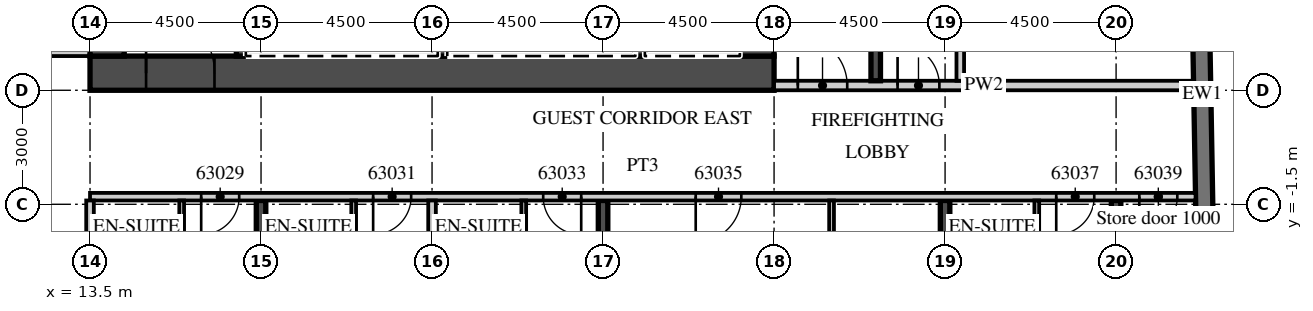
"""IFC4 building model, lengths in metres.
Left out: names, types, materials, properties, quantities, classifications, styles, units other than length and angle.
Written with IfcOpenShell. Run it as: python <this file> out.ifc"""

import sys

from ifc_helpers import new_model, si_unit, direction, frame, frame_2d, origin, place, context, subcontext, project, spatial, rectangle, extrude, element, fill, save


model = new_model("IFC4")
c1 = context("Model", 3, precision=1e-05, world=origin(), true_north=direction((0.0, 1.0)))
c2 = subcontext(c1, "Body", "Model", "MODEL_VIEW")
j1 = project(units=[si_unit("LENGTHUNIT", "METRE"), si_unit("PLANEANGLEUNIT", "RADIAN")], contexts=[c1])
p1 = place(None, origin())
s1 = spatial("IfcSite", under=j1, at=p1, CompositionType="ELEMENT")
p2 = place(p1, origin())
s2 = spatial("IfcBuilding", under=s1, at=p2, CompositionType="ELEMENT")
p3 = place(p2, frame((0.0, 0.0, 254.0)))
s3 = spatial("IfcBuildingStorey", under=s2, at=p3, CompositionType="ELEMENT", Elevation=254.0)
p4 = place(p3, frame((18.0, -19.079, 0.0), z_axis=(0.0, 0.0, 1.0), x_axis=(0.0, 1.0, 0.0)))
e1 = element("IfcWall", 1, at=p4, inside=s3, PredefinedType="SHEAR", context=c2, shape_type="SweptSolid", body=[
    extrude(rectangle(XDim=17.679, YDim=0.25, at=frame_2d((8.84, 0.0))), origin(), (0.0, 0.0, 1.0), 3.0),
])
p5 = place(p3, frame((27.0, -18.922, 0.0), z_axis=(0.0, 0.0, 1.0), x_axis=(0.0, 1.0, 0.0)))
e2 = element("IfcWall", 2, at=p5, inside=s3, PredefinedType="SHEAR", context=c2, shape_type="SweptSolid", body=[
    extrude(rectangle(XDim=17.522, YDim=0.25, at=frame_2d((8.761, 0.0))), origin(), (0.0, 0.0, 1.0), 3.0),
])
p6 = place(p3, frame((36.0, -18.765, 0.0), z_axis=(0.0, 0.0, 1.0), x_axis=(0.0, 1.0, 0.0)))
e3 = element("IfcWall", 3, at=p6, inside=s3, PredefinedType="SHEAR", context=c2, shape_type="SweptSolid", body=[
    extrude(rectangle(XDim=17.365, YDim=0.25, at=frame_2d((8.683, 0.0))), origin(), (0.0, 0.0, 1.0), 3.0),
])
p7 = place(p3, frame((40.5, -18.325, 0.0), z_axis=(0.0, 0.0, 1.0), x_axis=(0.0, 1.0, 0.0)))
e4 = element("IfcWall", 4, at=p7, inside=s3, PredefinedType="SHEAR", context=c2, shape_type="SweptSolid", body=[
    extrude(rectangle(XDim=16.925, YDim=0.25, at=frame_2d((8.463, 0.0))), origin(), (0.0, 0.0, 1.0), 3.0),
])
p8 = place(p3, frame((43.057, -15.103, 0.0), z_axis=(0.0, 0.0, 1.0), x_axis=(-0.017452408953, 0.999847695112, 0.0)))
e5 = element("IfcWall", 5, at=p8, inside=s3, PredefinedType="SOLIDWALL", context=c2, shape_type="SweptSolid", body=[
    extrude(rectangle(XDim=33.0, YDim=0.45, at=frame_2d((16.5, 0.0))), origin(), (0.0, 0.0, 1.0), 3.0),
])
p9 = place(p3, frame((-13.5, 2.5, 0.0), z_axis=(0.0, 0.0, 1.0), x_axis=(1.0, 0.0, 0.0)))
e6 = element("IfcWall", 6, at=p9, inside=s3, PredefinedType="PARTITIONING", context=c2, shape_type="SweptSolid", body=[
    extrude(rectangle(XDim=27.0, YDim=0.2, at=frame_2d((13.5, 0.0))), origin(), (0.0, 0.0, 1.0), 3.0),
])
p10 = place(p9, frame((0.575, 0.0, 0.0)))
e7 = element("IfcOpeningElement", 7, at=p10, cuts=e6, PredefinedType="OPENING", context=c2, shape_type="SweptSolid", body=[
    extrude(rectangle(XDim=1.0, YDim=2.1, at=frame_2d((0.5, 1.05))), frame((0.0, 0.11, 0.0), z_axis=(0.0, -1.0, 0.0), x_axis=(1.0, 0.0, 0.0)), (0.0, 0.0, 1.0), 0.22),
])
p11 = place(p9, frame((7.45, 0.0, 0.0)))
e8 = element("IfcOpeningElement", 8, at=p11, cuts=e6, PredefinedType="OPENING", context=c2, shape_type="SweptSolid", body=[
    extrude(rectangle(XDim=1.0, YDim=2.1, at=frame_2d((0.5, 1.05))), frame((0.0, 0.11, 0.0), z_axis=(0.0, -1.0, 0.0), x_axis=(1.0, 0.0, 0.0)), (0.0, 0.0, 1.0), 0.22),
])
p12 = place(p9, frame((11.925, 0.0, 0.0)))
e9 = element("IfcOpeningElement", 9, at=p12, cuts=e6, PredefinedType="OPENING", context=c2, shape_type="SweptSolid", body=[
    extrude(rectangle(XDim=1.0, YDim=2.1, at=frame_2d((0.5, 1.05))), frame((0.0, 0.11, 0.0), z_axis=(0.0, -1.0, 0.0), x_axis=(1.0, 0.0, 0.0)), (0.0, 0.0, 1.0), 0.22),
])
p13 = place(p9, frame((18.862, 0.0, 0.0)))
e10 = element("IfcOpeningElement", 10, at=p13, cuts=e6, PredefinedType="OPENING", context=c2, shape_type="SweptSolid", body=[
    extrude(rectangle(XDim=1.2, YDim=2.1, at=frame_2d((0.6, 1.05))), frame((0.0, 0.11, 0.0), z_axis=(0.0, -1.0, 0.0), x_axis=(1.0, 0.0, 0.0)), (0.0, 0.0, 1.0), 0.22),
])
p14 = place(p9, frame((23.075, 0.0, 0.0)))
e11 = element("IfcOpeningElement", 11, at=p14, cuts=e6, PredefinedType="OPENING", context=c2, shape_type="SweptSolid", body=[
    extrude(rectangle(XDim=1.0, YDim=2.1, at=frame_2d((0.5, 1.05))), frame((0.0, 0.11, 0.0), z_axis=(0.0, -1.0, 0.0), x_axis=(1.0, 0.0, 0.0)), (0.0, 0.0, 1.0), 0.22),
])
p15 = place(p3, frame((13.5, -1.3, 0.0), z_axis=(0.0, 0.0, 1.0), x_axis=(1.0, 0.0, 0.0)))
e12 = element("IfcWall", 12, at=p15, inside=s3, PredefinedType="PARTITIONING", context=c2, shape_type="SweptSolid", body=[
    extrude(rectangle(XDim=29.091, YDim=0.2, at=frame_2d((14.545, 0.0))), origin(), (0.0, 0.0, 1.0), 3.0),
])
p16 = place(p15, frame((2.925, 0.0, 0.0)))
e13 = element("IfcOpeningElement", 13, at=p16, cuts=e12, PredefinedType="OPENING", context=c2, shape_type="SweptSolid", body=[
    extrude(rectangle(XDim=1.0, YDim=2.1, at=frame_2d((0.5, 1.05))), frame((0.0, 0.11, 0.0), z_axis=(0.0, -1.0, 0.0), x_axis=(1.0, 0.0, 0.0)), (0.0, 0.0, 1.0), 0.22),
])
p17 = place(p15, frame((7.45, 0.0, 0.0)))
e14 = element("IfcOpeningElement", 14, at=p17, cuts=e12, PredefinedType="OPENING", context=c2, shape_type="SweptSolid", body=[
    extrude(rectangle(XDim=1.0, YDim=2.1, at=frame_2d((0.5, 1.05))), frame((0.0, 0.11, 0.0), z_axis=(0.0, -1.0, 0.0), x_axis=(1.0, 0.0, 0.0)), (0.0, 0.0, 1.0), 0.22),
])
p18 = place(p15, frame((11.925, 0.0, 0.0)))
e15 = element("IfcOpeningElement", 15, at=p18, cuts=e12, PredefinedType="OPENING", context=c2, shape_type="SweptSolid", body=[
    extrude(rectangle(XDim=1.0, YDim=2.1, at=frame_2d((0.5, 1.05))), frame((0.0, 0.11, 0.0), z_axis=(0.0, -1.0, 0.0), x_axis=(1.0, 0.0, 0.0)), (0.0, 0.0, 1.0), 0.22),
])
p19 = place(p15, frame((15.938, 0.0, 0.0)))
e16 = element("IfcOpeningElement", 16, at=p19, cuts=e12, PredefinedType="OPENING", context=c2, shape_type="SweptSolid", body=[
    extrude(rectangle(XDim=1.2, YDim=2.1, at=frame_2d((0.6, 1.05))), frame((0.0, 0.11, 0.0), z_axis=(0.0, -1.0, 0.0), x_axis=(1.0, 0.0, 0.0)), (0.0, 0.0, 1.0), 0.22),
])
p20 = place(p15, frame((25.425, 0.0, 0.0)))
e17 = element("IfcOpeningElement", 17, at=p20, cuts=e12, PredefinedType="OPENING", context=c2, shape_type="SweptSolid", body=[
    extrude(rectangle(XDim=1.0, YDim=2.1, at=frame_2d((0.5, 1.05))), frame((0.0, 0.11, 0.0), z_axis=(0.0, -1.0, 0.0), x_axis=(1.0, 0.0, 0.0)), (0.0, 0.0, 1.0), 0.22),
])
p21 = place(p15, frame((27.611, 0.0, 0.0)))
e18 = element("IfcOpeningElement", 18, at=p21, cuts=e12, PredefinedType="OPENING", context=c2, shape_type="SweptSolid", body=[
    extrude(rectangle(XDim=1.0, YDim=2.4, at=frame_2d((0.5, 1.2))), frame((0.0, 0.11, 0.0), z_axis=(0.0, -1.0, 0.0), x_axis=(1.0, 0.0, 0.0)), (0.0, 0.0, 1.0), 0.22),
])
p22 = place(p3, frame((13.5, -19.17, 0.0), z_axis=(0.0, 0.0, 1.0), x_axis=(0.0, 1.0, 0.0)))
e19 = element("IfcWall", 19, at=p22, inside=s3, PredefinedType="PARTITIONING", context=c2, shape_type="SweptSolid", body=[
    extrude(rectangle(XDim=17.77, YDim=0.2, at=frame_2d((8.885, 0.0))), origin(), (0.0, 0.0, 1.0), 3.0),
])
p23 = place(p3, frame((15.912, -6.125, 0.0), z_axis=(0.0, 0.0, 1.0), x_axis=(0.0, 1.0, 0.0)))
e20 = element("IfcWall", 20, at=p23, inside=s3, PredefinedType="PARTITIONING", context=c2, shape_type="SweptSolid", body=[
    extrude(rectangle(XDim=4.725, YDim=0.125, at=frame_2d((2.363, 0.0))), origin(), (0.0, 0.0, 1.0), 3.0),
])
p24 = place(p23, frame((1.375, 0.0, 0.0)))
e21 = element("IfcOpeningElement", 21, at=p24, cuts=e20, PredefinedType="OPENING", context=c2, shape_type="SweptSolid", body=[
    extrude(rectangle(XDim=0.9, YDim=2.1, at=frame_2d((0.45, 1.05))), frame((0.0, 0.073, 0.0), z_axis=(0.0, -1.0, 0.0), x_axis=(1.0, 0.0, 0.0)), (0.0, 0.0, 1.0), 0.145),
])
p25 = place(p3, frame((22.5, -19.013, 0.0), z_axis=(0.0, 0.0, 1.0), x_axis=(0.0, 1.0, 0.0)))
e22 = element("IfcWall", 22, at=p25, inside=s3, PredefinedType="PARTITIONING", context=c2, shape_type="SweptSolid", body=[
    extrude(rectangle(XDim=17.613, YDim=0.2, at=frame_2d((8.807, 0.0))), origin(), (0.0, 0.0, 1.0), 3.0),
])
p26 = place(p3, frame((20.438, -6.125, 0.0), z_axis=(0.0, 0.0, 1.0), x_axis=(0.0, 1.0, 0.0)))
e23 = element("IfcWall", 23, at=p26, inside=s3, PredefinedType="PARTITIONING", context=c2, shape_type="SweptSolid", body=[
    extrude(rectangle(XDim=4.725, YDim=0.125, at=frame_2d((2.363, 0.0))), origin(), (0.0, 0.0, 1.0), 3.0),
])
p27 = place(p26, frame((1.375, 0.0, 0.0)))
e24 = element("IfcOpeningElement", 24, at=p27, cuts=e23, PredefinedType="OPENING", context=c2, shape_type="SweptSolid", body=[
    extrude(rectangle(XDim=0.9, YDim=2.1, at=frame_2d((0.45, 1.05))), frame((0.0, 0.073, 0.0), z_axis=(0.0, -1.0, 0.0), x_axis=(1.0, 0.0, 0.0)), (0.0, 0.0, 1.0), 0.145),
])
p28 = place(p3, frame((24.913, -6.125, 0.0), z_axis=(0.0, 0.0, 1.0), x_axis=(0.0, 1.0, 0.0)))
e25 = element("IfcWall", 25, at=p28, inside=s3, PredefinedType="PARTITIONING", context=c2, shape_type="SweptSolid", body=[
    extrude(rectangle(XDim=4.725, YDim=0.125, at=frame_2d((2.363, 0.0))), origin(), (0.0, 0.0, 1.0), 3.0),
])
p29 = place(p28, frame((1.375, 0.0, 0.0)))
e26 = element("IfcOpeningElement", 26, at=p29, cuts=e25, PredefinedType="OPENING", context=c2, shape_type="SweptSolid", body=[
    extrude(rectangle(XDim=0.9, YDim=2.1, at=frame_2d((0.45, 1.05))), frame((0.0, 0.073, 0.0), z_axis=(0.0, -1.0, 0.0), x_axis=(1.0, 0.0, 0.0)), (0.0, 0.0, 1.0), 0.145),
])
p30 = place(p3, frame((33.013, -6.125, 0.0), z_axis=(0.0, 0.0, 1.0), x_axis=(0.0, 1.0, 0.0)))
e27 = element("IfcWall", 27, at=p30, inside=s3, PredefinedType="PARTITIONING", context=c2, shape_type="SweptSolid", body=[
    extrude(rectangle(XDim=4.725, YDim=0.125, at=frame_2d((2.363, 0.0))), origin(), (0.0, 0.0, 1.0), 3.0),
])
p31 = place(p30, frame((1.375, 0.0, 0.0)))
e28 = element("IfcOpeningElement", 28, at=p31, cuts=e27, PredefinedType="OPENING", context=c2, shape_type="SweptSolid", body=[
    extrude(rectangle(XDim=0.9, YDim=2.1, at=frame_2d((0.45, 1.05))), frame((0.0, 0.073, 0.0), z_axis=(0.0, -1.0, 0.0), x_axis=(1.0, 0.0, 0.0)), (0.0, 0.0, 1.0), 0.145),
])
p32 = place(p3, frame((38.413, -6.125, 0.0), z_axis=(0.0, 0.0, 1.0), x_axis=(0.0, 1.0, 0.0)))
e29 = element("IfcWall", 29, at=p32, inside=s3, PredefinedType="PARTITIONING", context=c2, shape_type="SweptSolid", body=[
    extrude(rectangle(XDim=4.725, YDim=0.125, at=frame_2d((2.363, 0.0))), origin(), (0.0, 0.0, 1.0), 3.0),
])
p33 = place(p32, frame((1.375, 0.0, 0.0)))
e30 = element("IfcOpeningElement", 30, at=p33, cuts=e29, PredefinedType="OPENING", context=c2, shape_type="SweptSolid", body=[
    extrude(rectangle(XDim=0.9, YDim=2.1, at=frame_2d((0.45, 1.05))), frame((0.0, 0.073, 0.0), z_axis=(0.0, -1.0, 0.0), x_axis=(1.0, 0.0, 0.0)), (0.0, 0.0, 1.0), 0.145),
])
p34 = place(p3, frame((13.5, 1.95, 0.0), z_axis=(0.0, 0.0, 1.0), x_axis=(1.0, 0.0, 0.0)))
e31 = element("IfcWall", 31, at=p34, inside=s3, PredefinedType="SHEAR", context=c2, shape_type="SweptSolid", body=[
    extrude(rectangle(XDim=18.0, YDim=0.9, at=frame_2d((9.0, 0.0))), origin(), (0.0, 0.0, 1.0), 3.0),
])
p35 = place(p34, frame((1.475, 0.0, 0.0)))
e32 = element("IfcOpeningElement", 32, at=p35, cuts=e31, PredefinedType="OPENING", context=c2, shape_type="SweptSolid", body=[
    extrude(rectangle(XDim=1.8, YDim=2.1, at=frame_2d((0.9, 1.05))), frame((0.0, 0.46, 0.0), z_axis=(0.0, -1.0, 0.0), x_axis=(1.0, 0.0, 0.0)), (0.0, 0.0, 1.0), 0.92),
])
p36 = place(p3, frame((31.05, 2.4, 0.0), z_axis=(0.0, 0.0, 1.0), x_axis=(0.0, 1.0, 0.0)))
e33 = element("IfcWall", 33, at=p36, inside=s3, PredefinedType="SHEAR", context=c2, shape_type="SweptSolid", body=[
    extrude(rectangle(XDim=12.8, YDim=0.9, at=frame_2d((6.4, 0.0))), origin(), (0.0, 0.0, 1.0), 3.0),
])
p37 = place(p36, frame((0.2, 0.0, 0.0)))
e34 = element("IfcOpeningElement", 34, at=p37, cuts=e33, PredefinedType="OPENING", context=c2, shape_type="SweptSolid", body=[
    extrude(rectangle(XDim=1.1, YDim=2.1, at=frame_2d((0.55, 1.05))), frame((0.0, 0.46, 0.0), z_axis=(0.0, -1.0, 0.0), x_axis=(1.0, 0.0, 0.0)), (0.0, 0.0, 1.0), 0.92),
])
p38 = place(p3, frame((13.95, 2.4, 0.0), z_axis=(0.0, 0.0, 1.0), x_axis=(0.0, 1.0, 0.0)))
e35 = element("IfcWall", 35, at=p38, inside=s3, PredefinedType="SHEAR", context=c2, shape_type="SweptSolid", body=[
    extrude(rectangle(XDim=12.2, YDim=0.9, at=frame_2d((6.1, 0.0))), origin(), (0.0, 0.0, 1.0), 3.0),
])
p39 = place(p3, frame((17.475, 2.4, 0.0), z_axis=(0.0, 0.0, 1.0), x_axis=(0.0, 1.0, 0.0)))
e36 = element("IfcWall", 36, at=p39, inside=s3, PredefinedType="SHEAR", context=c2, shape_type="SweptSolid", body=[
    extrude(rectangle(XDim=3.15, YDim=0.25, at=frame_2d((1.575, 0.0))), origin(), (0.0, 0.0, 1.0), 3.0),
])
for number, where, z_axis, x_axis in (
    (37, (27.975, 2.4, 0.0), (0.0, 0.0, 1.0), (0.0, 1.0, 0.0)),
    (38, (22.775, 2.4, 0.0), (0.0, 0.0, 1.0), (0.0, 1.0, 0.0)),
):
    element("IfcWall", number, at=place(p3, frame(where, z_axis=z_axis, x_axis=x_axis)), inside=s3, PredefinedType="SHEAR", context=c2, shape_type="SweptSolid", body=[
        extrude(rectangle(XDim=2.9, YDim=0.25, at=frame_2d((1.45, 0.0))), origin(), (0.0, 0.0, 1.0), 3.0),
    ])
p40 = place(p3, frame((31.5, 1.625, 0.0), z_axis=(0.0, 0.0, 1.0), x_axis=(1.0, 0.0, 0.0)))
e39 = element("IfcWall", 39, at=p40, inside=s3, PredefinedType="PARTITIONING", context=c2, shape_type="SweptSolid", body=[
    extrude(rectangle(XDim=11.04, YDim=0.25, at=frame_2d((5.52, 0.0))), origin(), (0.0, 0.0, 1.0), 3.0),
])
p41 = place(p40, frame((0.625, 0.0, 0.0)))
e40 = element("IfcOpeningElement", 40, at=p41, cuts=e39, PredefinedType="OPENING", context=c2, shape_type="SweptSolid", body=[
    extrude(rectangle(XDim=1.3, YDim=2.1, at=frame_2d((0.65, 1.05))), frame((0.0, 0.135, 0.0), z_axis=(0.0, -1.0, 0.0), x_axis=(1.0, 0.0, 0.0)), (0.0, 0.0, 1.0), 0.27),
])
p42 = place(p40, frame((3.25, 0.0, 0.0)))
e41 = element("IfcOpeningElement", 41, at=p42, cuts=e39, PredefinedType="OPENING", context=c2, shape_type="SweptSolid", body=[
    extrude(rectangle(XDim=1.1, YDim=2.1, at=frame_2d((0.55, 1.05))), frame((0.0, 0.135, 0.0), z_axis=(0.0, -1.0, 0.0), x_axis=(1.0, 0.0, 0.0)), (0.0, 0.0, 1.0), 0.27),
])
p43 = place(p3, frame((34.175, 1.75, 0.0), z_axis=(0.0, 0.0, 1.0), x_axis=(0.0, 1.0, 0.0)))
e42 = element("IfcWall", 42, at=p43, inside=s3, PredefinedType="SHEAR", context=c2, shape_type="SweptSolid", body=[
    extrude(rectangle(XDim=8.35, YDim=0.25, at=frame_2d((4.175, 0.0))), origin(), (0.0, 0.0, 1.0), 3.0),
])
p44 = place(p3, frame((36.4, 1.75, 0.0), z_axis=(0.0, 0.0, 1.0), x_axis=(0.0, 1.0, 0.0)))
e43 = element("IfcWall", 43, at=p44, inside=s3, PredefinedType="PARTITIONING", context=c2, shape_type="SweptSolid", body=[
    extrude(rectangle(XDim=15.95, YDim=0.2, at=frame_2d((7.975, 0.0))), origin(), (0.0, 0.0, 1.0), 3.0),
])
p45 = place(p44, frame((14.7, 0.0, 0.0)))
e44 = element("IfcOpeningElement", 44, at=p45, cuts=e43, PredefinedType="OPENING", context=c2, shape_type="SweptSolid", body=[
    extrude(rectangle(XDim=0.9, YDim=2.1, at=frame_2d((0.45, 1.05))), frame((0.0, 0.11, 0.0), z_axis=(0.0, -1.0, 0.0), x_axis=(1.0, 0.0, 0.0)), (0.0, 0.0, 1.0), 0.22),
])
p46 = place(p16, origin())
e45 = element("IfcDoor", 45, at=p46, inside=s3, OperationType="SINGLE_SWING_LEFT", PredefinedType="DOOR", context=c2, shape_type="SweptSolid", body=[
    extrude(rectangle(XDim=1.0, YDim=2.1, at=frame_2d((0.5, 1.05))), frame((0.0, 0.025, 0.0), z_axis=(0.0, -1.0, 0.0), x_axis=(1.0, 0.0, 0.0)), (0.0, 0.0, 1.0), 0.05),
])
fill(e13, e45)
p47 = place(p17, origin())
e46 = element("IfcDoor", 46, at=p47, inside=s3, OperationType="SINGLE_SWING_LEFT", PredefinedType="DOOR", context=c2, shape_type="SweptSolid", body=[
    extrude(rectangle(XDim=1.0, YDim=2.1, at=frame_2d((0.5, 1.05))), frame((0.0, 0.025, 0.0), z_axis=(0.0, -1.0, 0.0), x_axis=(1.0, 0.0, 0.0)), (0.0, 0.0, 1.0), 0.05),
])
fill(e14, e46)
p48 = place(p18, origin())
e47 = element("IfcDoor", 47, at=p48, inside=s3, OperationType="SINGLE_SWING_RIGHT", PredefinedType="DOOR", context=c2, shape_type="SweptSolid", body=[
    extrude(rectangle(XDim=1.0, YDim=2.1, at=frame_2d((0.5, 1.05))), frame((0.0, 0.025, 0.0), z_axis=(0.0, -1.0, 0.0), x_axis=(1.0, 0.0, 0.0)), (0.0, 0.0, 1.0), 0.05),
])
fill(e15, e47)
p49 = place(p19, origin())
e48 = element("IfcDoor", 48, at=p49, inside=s3, OperationType="SINGLE_SWING_LEFT", PredefinedType="DOOR", context=c2, shape_type="SweptSolid", body=[
    extrude(rectangle(XDim=1.2, YDim=2.1, at=frame_2d((0.6, 1.05))), frame((0.0, 0.025, 0.0), z_axis=(0.0, -1.0, 0.0), x_axis=(1.0, 0.0, 0.0)), (0.0, 0.0, 1.0), 0.05),
])
fill(e16, e48)
p50 = place(p20, origin())
e49 = element("IfcDoor", 49, at=p50, inside=s3, OperationType="SINGLE_SWING_LEFT", PredefinedType="DOOR", context=c2, shape_type="SweptSolid", body=[
    extrude(rectangle(XDim=1.0, YDim=2.1, at=frame_2d((0.5, 1.05))), frame((0.0, 0.025, 0.0), z_axis=(0.0, -1.0, 0.0), x_axis=(1.0, 0.0, 0.0)), (0.0, 0.0, 1.0), 0.05),
])
fill(e17, e49)
p51 = place(p21, origin())
e50 = element("IfcDoor", 50, at=p51, inside=s3, OperationType="SINGLE_SWING_LEFT", PredefinedType="DOOR", context=c2, shape_type="SweptSolid", body=[
    extrude(rectangle(XDim=1.0, YDim=2.4, at=frame_2d((0.5, 1.2))), frame((0.0, 0.025, 0.0), z_axis=(0.0, -1.0, 0.0), x_axis=(1.0, 0.0, 0.0)), (0.0, 0.0, 1.0), 0.05),
])
fill(e18, e50)
p52 = place(p35, origin())
e51 = element("IfcDoor", 51, at=p52, inside=s3, OperationType="DOUBLE_DOOR_DOUBLE_SWING", PredefinedType="DOOR", context=c2, shape_type="SweptSolid", body=[
    extrude(rectangle(XDim=1.8, YDim=2.1, at=frame_2d((0.9, 1.05))), frame((0.0, 0.025, 0.0), z_axis=(0.0, -1.0, 0.0), x_axis=(1.0, 0.0, 0.0)), (0.0, 0.0, 1.0), 0.05),
])
fill(e32, e51)
p53 = place(p41, origin())
e52 = element("IfcDoor", 52, at=p53, inside=s3, OperationType="SINGLE_SWING_LEFT", PredefinedType="DOOR", context=c2, shape_type="SweptSolid", body=[
    extrude(rectangle(XDim=1.3, YDim=2.1, at=frame_2d((0.65, 1.05))), frame((0.0, 0.025, 0.0), z_axis=(0.0, -1.0, 0.0), x_axis=(1.0, 0.0, 0.0)), (0.0, 0.0, 1.0), 0.05),
])
fill(e40, e52)
p54 = place(p42, origin())
e53 = element("IfcDoor", 53, at=p54, inside=s3, OperationType="SINGLE_SWING_LEFT", PredefinedType="DOOR", context=c2, shape_type="SweptSolid", body=[
    extrude(rectangle(XDim=1.1, YDim=2.1, at=frame_2d((0.55, 1.05))), frame((0.0, 0.025, 0.0), z_axis=(0.0, -1.0, 0.0), x_axis=(1.0, 0.0, 0.0)), (0.0, 0.0, 1.0), 0.05),
])
fill(e41, e53)
save(model, sys.argv[1])
